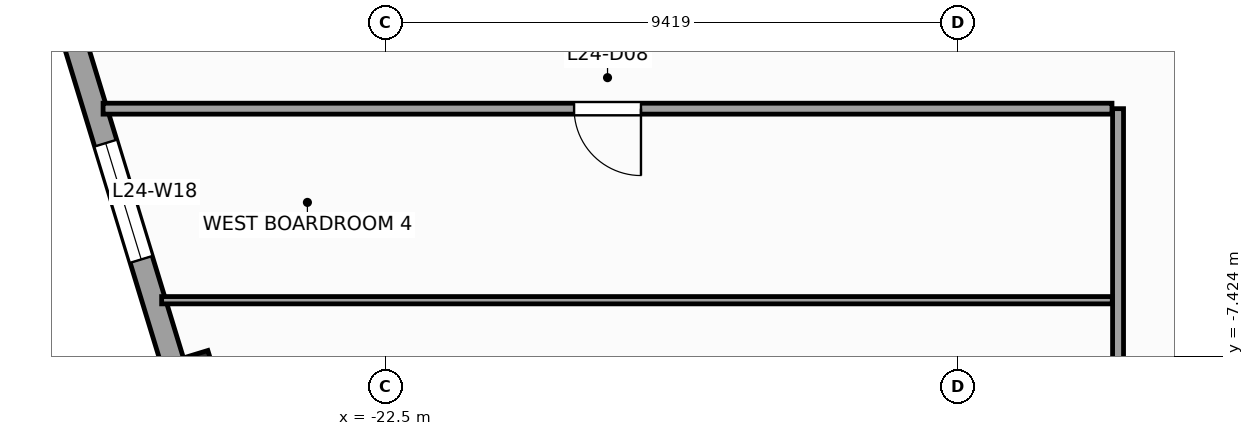
"""IFC4 building model, lengths in metres.
Left out: names, types, materials, properties, quantities, classifications, styles, units other than length and angle.
Written with IfcOpenShell. Run it as: python <this file> out.ifc"""

import sys

from ifc_helpers import new_model, si_unit, direction, frame, frame_2d, origin, origin_2d, place, context, subcontext, project, spatial, rectangle, extrude, source, transform, mapped, element, fill, save


model = new_model("IFC4")
c1 = context("Model", 3, precision=1e-05, world=origin(), true_north=direction((0.0, 1.0)))
c2 = subcontext(c1, "Body", "Model", "MODEL_VIEW")
j1 = project(units=[si_unit("LENGTHUNIT", "METRE"), si_unit("PLANEANGLEUNIT", "RADIAN")], contexts=[c1])
p1 = place(None, origin())
s1 = spatial("IfcSite", under=j1, at=p1, CompositionType="ELEMENT")
p2 = place(p1, origin())
s2 = spatial("IfcBuilding", under=s1, at=p2, CompositionType="ELEMENT")
p3 = place(p2, frame((0.0, 0.0, 103.2)))
s3 = spatial("IfcBuildingStorey", under=s2, at=p3, CompositionType="ELEMENT", Elevation=103.2)
m1 = source(origin(), c2, "Body", "SweptSolid", [
    extrude(rectangle(XDim=0.75, YDim=0.85, at=origin_2d()), origin(), (0.0, 0.0, 1.0), 4.0),
])
p4 = place(p3, frame((-25.653, -7.843, 0.0), z_axis=(0.0, 0.0, 1.0), x_axis=(0.956304755963, 0.292371704723, 0.0)))
e1 = element("IfcColumn", 1, at=p4, inside=s3, PredefinedType="COLUMN", context=c2, shape_type="MappedRepresentation", body=[
    mapped(m1, transform((0.0, 0.0, 0.0), scale=1.0)),
])
p5 = place(p3, frame((-32.658, 14.265, 0.0), z_axis=(0.0, 0.0, 1.0), x_axis=(0.292373127906, -0.956304320851, 0.0)))
e2 = element("IfcWall", 2, at=p5, inside=s3, PredefinedType="STANDARD", context=c2, shape_type="SweptSolid", body=[
    extrude(rectangle(XDim=46.38, YDim=0.38, at=frame_2d((23.19, 0.0))), origin(), (0.0, 0.0, 1.0), 3.14),
])
p6 = place(p5, frame((4.865, 0.0, 0.51)))
e3 = element("IfcOpeningElement", 3, at=p6, cuts=e2, PredefinedType="OPENING", context=c2, shape_type="SweptSolid", body=[
    extrude(rectangle(XDim=1.4, YDim=2.4, at=frame_2d((0.7, 1.2))), frame((0.0, 0.2, 0.0), z_axis=(0.0, -1.0, 0.0), x_axis=(1.0, 0.0, 0.0)), (0.0, 0.0, 1.0), 0.4),
])
p7 = place(p5, frame((12.45, 0.0, 0.51)))
e4 = element("IfcOpeningElement", 4, at=p7, cuts=e2, PredefinedType="OPENING", context=c2, shape_type="SweptSolid", body=[
    extrude(rectangle(XDim=2.0, YDim=2.4, at=frame_2d((1.0, 1.2))), frame((0.0, 0.2, 0.0), z_axis=(0.0, -1.0, 0.0), x_axis=(1.0, 0.0, 0.0)), (0.0, 0.0, 1.0), 0.4),
])
p8 = place(p5, frame((19.012, 0.0, 0.51)))
e5 = element("IfcOpeningElement", 5, at=p8, cuts=e2, PredefinedType="OPENING", context=c2, shape_type="SweptSolid", body=[
    extrude(rectangle(XDim=2.0, YDim=2.4, at=frame_2d((1.0, 1.2))), frame((0.0, 0.2, 0.0), z_axis=(0.0, -1.0, 0.0), x_axis=(1.0, 0.0, 0.0)), (0.0, 0.0, 1.0), 0.4),
])
p9 = place(p5, frame((30.538, 0.0, 0.51)))
e6 = element("IfcOpeningElement", 6, at=p9, cuts=e2, PredefinedType="OPENING", context=c2, shape_type="SweptSolid", body=[
    extrude(rectangle(XDim=2.0, YDim=2.4, at=frame_2d((1.0, 1.2))), frame((0.0, 0.2, 0.0), z_axis=(0.0, -1.0, 0.0), x_axis=(1.0, 0.0, 0.0)), (0.0, 0.0, 1.0), 0.4),
])
p10 = place(p5, frame((39.187, 0.0, 0.51)))
e7 = element("IfcOpeningElement", 7, at=p10, cuts=e2, PredefinedType="OPENING", context=c2, shape_type="SweptSolid", body=[
    extrude(rectangle(XDim=1.4, YDim=2.4, at=frame_2d((0.7, 1.2))), frame((0.0, 0.2, 0.0), z_axis=(0.0, -1.0, 0.0), x_axis=(1.0, 0.0, 0.0)), (0.0, 0.0, 1.0), 0.4),
])
p11 = place(p3, frame((-10.45, -10.45, 0.0), z_axis=(0.0, 0.0, 1.0), x_axis=(0.0, 1.0, 0.0)))
e8 = element("IfcWall", 8, at=p11, inside=s3, PredefinedType="PARTITIONING", context=c2, shape_type="SweptSolid", body=[
    extrude(rectangle(XDim=7.1, YDim=0.18, at=frame_2d((3.55, 0.0))), origin(), (0.0, 0.0, 1.0), 3.74),
])
p12 = place(p3, frame((-27.142, -3.35, 0.0), z_axis=(0.0, 0.0, 1.0), x_axis=(1.0, 0.0, 0.0)))
e9 = element("IfcWall", 9, at=p12, inside=s3, PredefinedType="PARTITIONING", context=c2, shape_type="SweptSolid", body=[
    extrude(rectangle(XDim=16.592, YDim=0.18, at=frame_2d((8.296, 0.0))), origin(), (0.0, 0.0, 1.0), 3.74),
])
p13 = place(p12, frame((7.746, 0.0, 0.0)))
e10 = element("IfcOpeningElement", 10, at=p13, cuts=e9, PredefinedType="OPENING", context=c2, shape_type="SweptSolid", body=[
    extrude(rectangle(XDim=1.1, YDim=2.2, at=frame_2d((0.55, 1.1))), frame((0.0, 0.1, 0.0), z_axis=(0.0, -1.0, 0.0), x_axis=(1.0, 0.0, 0.0)), (0.0, 0.0, 1.0), 0.2),
])
p14 = place(p3, frame((-26.178, -6.5, 0.0), z_axis=(0.0, 0.0, 1.0), x_axis=(1.0, 0.0, 0.0)))
e11 = element("IfcWall", 11, at=p14, inside=s3, PredefinedType="PARTITIONING", context=c2, shape_type="SweptSolid", body=[
    extrude(rectangle(XDim=15.634, YDim=0.12, at=frame_2d((7.817, 0.0))), origin(), (0.0, 0.0, 1.0), 3.74),
])
m2 = source(origin(), c2, "Body", "SweptSolid", [
    extrude(rectangle(XDim=2.0, YDim=2.4, at=frame_2d((1.0, 1.2))), frame((0.0, 0.03, 0.0), z_axis=(0.0, -1.0, 0.0), x_axis=(1.0, 0.0, 0.0)), (0.0, 0.0, 1.0), 0.06),
])
p15 = place(p8, origin())
e12 = element("IfcWindow", 12, at=p15, inside=s3, PartitioningType="SINGLE_PANEL", PredefinedType="WINDOW", context=c2, shape_type="MappedRepresentation", body=[
    mapped(m2, transform((0.0, 0.0, 0.0), scale=1.0)),
])
fill(e5, e12)
m3 = source(origin(), c2, "Body", "SweptSolid", [
    extrude(rectangle(XDim=1.1, YDim=2.2, at=frame_2d((0.55, 1.1))), frame((0.0, 0.025, 0.0), z_axis=(0.0, -1.0, 0.0), x_axis=(1.0, 0.0, 0.0)), (0.0, 0.0, 1.0), 0.05),
])
p16 = place(p13, frame((1.1, 0.0, 0.0), z_axis=(0.0, 0.0, 1.0), x_axis=(-1.0, 0.0, 0.0)))
e13 = element("IfcDoor", 13, at=p16, inside=s3, OperationType="SINGLE_SWING_RIGHT", PredefinedType="DOOR", context=c2, shape_type="MappedRepresentation", body=[
    mapped(m3, transform((0.0, 0.0, 0.0), scale=1.0)),
])
fill(e10, e13)
save(model, sys.argv[1])
